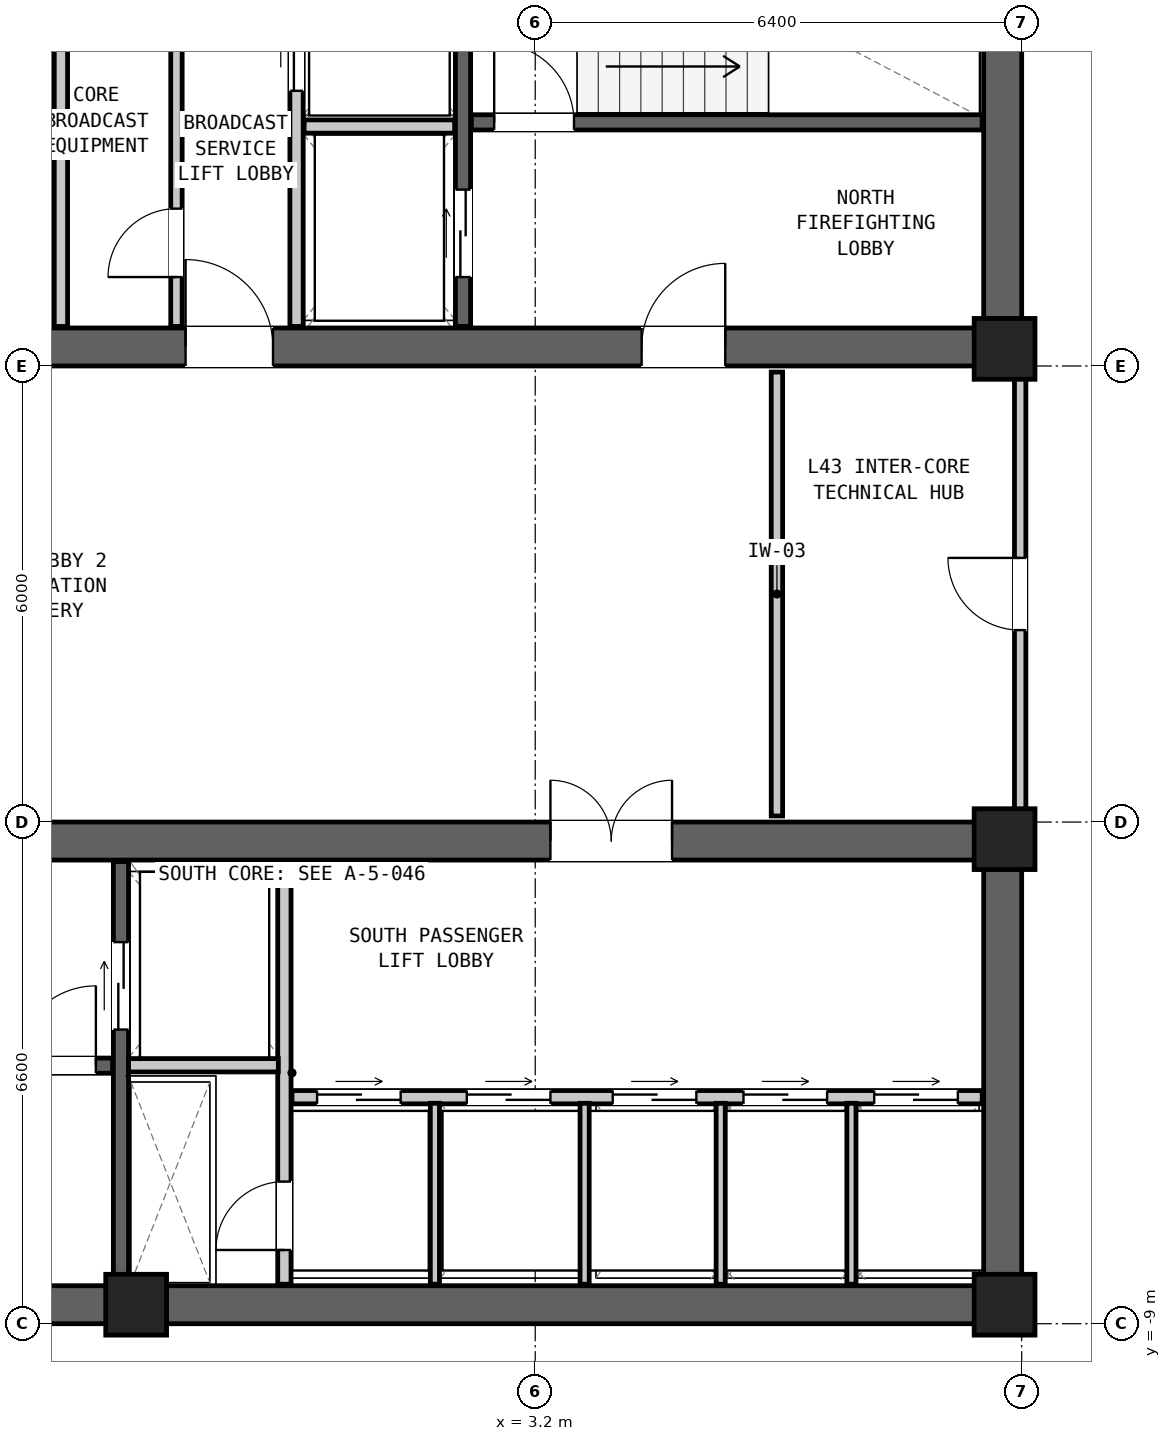
"""IFC4 building model, lengths in metres.
Left out: names, types, materials, properties, quantities, classifications, styles, units other than length and angle.
Written with IfcOpenShell. Run it as: python <this file> out.ifc"""

import sys

from ifc_helpers import new_model, si_unit, direction, frame, frame_2d, origin, origin_2d, place, context, subcontext, project, spatial, rectangle, extrude, element, fill, save


model = new_model("IFC4")
c1 = context("Model", 3, precision=1e-05, world=origin(), true_north=direction((0.0, 1.0)))
c2 = subcontext(c1, "Body", "Model", "MODEL_VIEW")
j1 = project(units=[si_unit("LENGTHUNIT", "METRE"), si_unit("PLANEANGLEUNIT", "RADIAN")], contexts=[c1])
p1 = place(None, origin())
s1 = spatial("IfcSite", under=j1, at=p1, CompositionType="ELEMENT")
p2 = place(p1, origin())
s2 = spatial("IfcBuilding", under=s1, at=p2, CompositionType="ELEMENT")
p3 = place(p2, frame((0.0, 0.0, 148.2)))
s3 = spatial("IfcBuildingStorey", under=s2, at=p3, CompositionType="ELEMENT", Elevation=148.2)
p4 = place(p3, frame((-9.6, 3.85, 0.0), z_axis=(0.0, 0.0, 1.0), x_axis=(1.0, 0.0, 0.0)))
e1 = element("IfcWall", 1, at=p4, inside=s3, PredefinedType="SHEAR", context=c2, shape_type="SweptSolid", body=[
    extrude(rectangle(XDim=19.2, YDim=0.5, at=frame_2d((9.6, 0.0))), origin(), (0.0, 0.0, 1.0), 3.6),
])
p5 = place(p4, frame((14.2, 0.0, 0.0)))
e2 = element("IfcOpeningElement", 2, at=p5, cuts=e1, PredefinedType="OPENING", context=c2, shape_type="SweptSolid", body=[
    extrude(rectangle(XDim=1.1, YDim=2.08, at=frame_2d((0.55, 1.04))), frame((0.0, 0.262, 0.0), z_axis=(0.0, -1.0, 0.0), x_axis=(1.0, 0.0, 0.0)), (0.0, 0.0, 1.0), 0.524),
])
p6 = place(p4, frame((8.2, 0.0, 0.0)))
e3 = element("IfcOpeningElement", 3, at=p6, cuts=e1, PredefinedType="OPENING", context=c2, shape_type="SweptSolid", body=[
    extrude(rectangle(XDim=1.15, YDim=2.1, at=frame_2d((0.575, 1.05))), frame((0.0, 0.262, 0.0), z_axis=(0.0, -1.0, 0.0), x_axis=(1.0, 0.0, 0.0)), (0.0, 0.0, 1.0), 0.524),
])
p7 = place(p4, frame((2.5, 0.0, 0.0)))
e4 = element("IfcOpeningElement", 4, at=p7, cuts=e1, PredefinedType="OPENING", context=c2, shape_type="SweptSolid", body=[
    extrude(rectangle(XDim=1.2, YDim=2.1, at=frame_2d((0.6, 1.05))), frame((0.0, 0.262, 0.0), z_axis=(0.0, -1.0, 0.0), x_axis=(1.0, 0.0, 0.0)), (0.0, 0.0, 1.0), 0.524),
])
p8 = place(p3, frame((9.35, 3.6, 0.0), z_axis=(0.0, 0.0, 1.0), x_axis=(0.0, 1.0, 0.0)))
e5 = element("IfcWall", 5, at=p8, inside=s3, PredefinedType="SHEAR", context=c2, shape_type="SweptSolid", body=[
    extrude(rectangle(XDim=6.6, YDim=0.5, at=frame_2d((3.3, 0.0))), origin(), (0.0, 0.0, 1.0), 3.6),
])
p9 = place(p3, frame((-9.6, -8.75, 0.0), z_axis=(0.0, 0.0, 1.0), x_axis=(1.0, 0.0, 0.0)))
e6 = element("IfcWall", 6, at=p9, inside=s3, PredefinedType="SHEAR", context=c2, shape_type="SweptSolid", body=[
    extrude(rectangle(XDim=19.2, YDim=0.5, at=frame_2d((9.6, 0.0))), origin(), (0.0, 0.0, 1.0), 3.6),
])
p10 = place(p3, frame((-9.6, -2.65, 0.0), z_axis=(0.0, 0.0, 1.0), x_axis=(1.0, 0.0, 0.0)))
e7 = element("IfcWall", 7, at=p10, inside=s3, PredefinedType="SHEAR", context=c2, shape_type="SweptSolid", body=[
    extrude(rectangle(XDim=19.2, YDim=0.5, at=frame_2d((9.6, 0.0))), origin(), (0.0, 0.0, 1.0), 3.6),
])
p11 = place(p10, frame((3.8, 0.0, 0.0)))
e8 = element("IfcOpeningElement", 8, at=p11, cuts=e7, PredefinedType="OPENING", context=c2, shape_type="SweptSolid", body=[
    extrude(rectangle(XDim=1.1, YDim=2.08, at=frame_2d((0.55, 1.04))), frame((0.0, 0.262, 0.0), z_axis=(0.0, -1.0, 0.0), x_axis=(1.0, 0.0, 0.0)), (0.0, 0.0, 1.0), 0.524),
])
p12 = place(p10, frame((13.0, 0.0, 0.0)))
e9 = element("IfcOpeningElement", 9, at=p12, cuts=e7, PredefinedType="OPENING", context=c2, shape_type="SweptSolid", body=[
    extrude(rectangle(XDim=1.6, YDim=2.12, at=frame_2d((0.8, 1.06))), frame((0.0, 0.262, 0.0), z_axis=(0.0, -1.0, 0.0), x_axis=(1.0, 0.0, 0.0)), (0.0, 0.0, 1.0), 0.524),
])
p13 = place(p3, frame((9.35, -9.0, 0.0), z_axis=(0.0, 0.0, 1.0), x_axis=(0.0, 1.0, 0.0)))
e10 = element("IfcWall", 10, at=p13, inside=s3, PredefinedType="SHEAR", context=c2, shape_type="SweptSolid", body=[
    extrude(rectangle(XDim=6.6, YDim=0.5, at=frame_2d((3.3, 0.0))), origin(), (0.0, 0.0, 1.0), 3.6),
])
for number, where, z_axis, x_axis in (
    (11, (9.375, 3.825, 0.0), (0.0, 0.0, 1.0), (1.0, 0.0, 0.0)),
    (12, (9.375, -2.625, 0.0), (0.0, 0.0, 1.0), (1.0, 0.0, 0.0)),
    (13, (-2.05, -8.75, 0.0), (0.0, 0.0, 1.0), (1.0, 0.0, 0.0)),
    (14, (9.375, -8.75, 0.0), (0.0, 0.0, 1.0), (1.0, 0.0, 0.0)),
):
    element("IfcColumn", number, at=place(p3, frame(where, z_axis=z_axis, x_axis=x_axis)), inside=s3, PredefinedType="COLUMN", context=c2, shape_type="SweptSolid", body=[
        extrude(rectangle(XDim=0.8, YDim=0.8, at=origin_2d()), origin(), (0.0, 0.0, 1.0), 3.6),
    ])
p14 = place(p3, frame((2.36, 6.805, 0.0), z_axis=(0.0, 0.0, 1.0), x_axis=(1.0, 0.0, 0.0)))
e15 = element("IfcWall", 15, at=p14, inside=s3, PredefinedType="SHEAR", context=c2, shape_type="SweptSolid", body=[
    extrude(rectangle(XDim=6.72, YDim=0.2, at=frame_2d((3.36, 0.0))), origin(), (0.0, 0.0, 1.0), 3.22),
])
p15 = place(p14, frame((0.3, 0.0, 0.0)))
e16 = element("IfcOpeningElement", 16, at=p15, cuts=e15, PredefinedType="OPENING", context=c2, shape_type="SweptSolid", body=[
    extrude(rectangle(XDim=1.05, YDim=2.08, at=frame_2d((0.525, 1.04))), frame((0.0, 0.112, 0.0), z_axis=(0.0, -1.0, 0.0), x_axis=(1.0, 0.0, 0.0)), (0.0, 0.0, 1.0), 0.224),
])
p16 = place(p3, frame((2.25, 4.12, 0.0), z_axis=(0.0, 0.0, 1.0), x_axis=(0.0, 1.0, 0.0)))
e17 = element("IfcWall", 17, at=p16, inside=s3, PredefinedType="SHEAR", context=c2, shape_type="SweptSolid", body=[
    extrude(rectangle(XDim=5.56, YDim=0.2, at=frame_2d((2.78, 0.0))), origin(), (0.0, 0.0, 1.0), 3.22),
])
p17 = place(p16, frame((0.65, 0.0, 0.0)))
e18 = element("IfcOpeningElement", 18, at=p17, cuts=e17, PredefinedType="OPENING", context=c2, shape_type="SweptSolid", body=[
    extrude(rectangle(XDim=1.15, YDim=2.08, at=frame_2d((0.575, 1.04))), frame((0.0, 0.112, 0.0), z_axis=(0.0, -1.0, 0.0), x_axis=(1.0, 0.0, 0.0)), (0.0, 0.0, 1.0), 0.224),
])
p18 = place(p3, frame((0.06, 4.12, 0.0), z_axis=(0.0, 0.0, 1.0), x_axis=(0.0, 1.0, 0.0)))
e19 = element("IfcWall", 19, at=p18, inside=s3, PredefinedType="PARTITIONING", context=c2, shape_type="SweptSolid", body=[
    extrude(rectangle(XDim=5.56, YDim=0.175, at=frame_2d((2.78, 0.0))), origin(), (0.0, 0.0, 1.0), 3.22),
])
p19 = place(p18, frame((3.1, 0.0, 0.0)))
e20 = element("IfcOpeningElement", 20, at=p19, cuts=e19, PredefinedType="OPENING", context=c2, shape_type="SweptSolid", body=[
    extrude(rectangle(XDim=1.4, YDim=2.12, at=frame_2d((0.7, 1.06))), frame((0.0, 0.1, 0.0), z_axis=(0.0, -1.0, 0.0), x_axis=(1.0, 0.0, 0.0)), (0.0, 0.0, 1.0), 0.199),
])
p20 = place(p3, frame((0.16, 6.75, 0.0), z_axis=(0.0, 0.0, 1.0), x_axis=(1.0, 0.0, 0.0)))
e21 = element("IfcWall", 21, at=p20, inside=s3, PredefinedType="PARTITIONING", context=c2, shape_type="SweptSolid", body=[
    extrude(rectangle(XDim=1.98, YDim=0.175, at=frame_2d((0.99, 0.0))), origin(), (0.0, 0.0, 1.0), 3.22),
])
p21 = place(p3, frame((-3.04, 4.12, 0.0), z_axis=(0.0, 0.0, 1.0), x_axis=(0.0, 1.0, 0.0)))
e22 = element("IfcWall", 22, at=p21, inside=s3, PredefinedType="PARTITIONING", context=c2, shape_type="SweptSolid", body=[
    extrude(rectangle(XDim=5.56, YDim=0.175, at=frame_2d((2.78, 0.0))), origin(), (0.0, 0.0, 1.0), 3.22),
])
p22 = place(p3, frame((-1.52, 4.12, 0.0), z_axis=(0.0, 0.0, 1.0), x_axis=(0.0, 1.0, 0.0)))
e23 = element("IfcWall", 23, at=p22, inside=s3, PredefinedType="PARTITIONING", context=c2, shape_type="SweptSolid", body=[
    extrude(rectangle(XDim=5.56, YDim=0.15, at=frame_2d((2.78, 0.0))), origin(), (0.0, 0.0, 1.0), 3.22),
])
p23 = place(p22, frame((4.38, 0.0, 0.0)))
e24 = element("IfcOpeningElement", 24, at=p23, cuts=e23, PredefinedType="OPENING", context=c2, shape_type="SweptSolid", body=[
    extrude(rectangle(XDim=0.9, YDim=2.05, at=frame_2d((0.45, 1.025))), frame((0.0, 0.087, 0.0), z_axis=(0.0, -1.0, 0.0), x_axis=(1.0, 0.0, 0.0)), (0.0, 0.0, 1.0), 0.174),
])
p24 = place(p22, frame((0.65, 0.0, 0.0)))
e25 = element("IfcOpeningElement", 25, at=p24, cuts=e23, PredefinedType="OPENING", context=c2, shape_type="SweptSolid", body=[
    extrude(rectangle(XDim=0.9, YDim=2.05, at=frame_2d((0.45, 1.025))), frame((0.0, 0.087, 0.0), z_axis=(0.0, -1.0, 0.0), x_axis=(1.0, 0.0, 0.0)), (0.0, 0.0, 1.0), 0.174),
])
p25 = place(p3, frame((-9.08, -5.605, 0.0), z_axis=(0.0, 0.0, 1.0), x_axis=(1.0, 0.0, 0.0)))
e26 = element("IfcWall", 26, at=p25, inside=s3, PredefinedType="SHEAR", context=c2, shape_type="SweptSolid", body=[
    extrude(rectangle(XDim=6.72, YDim=0.2, at=frame_2d((3.36, 0.0))), origin(), (0.0, 0.0, 1.0), 3.22),
])
p26 = place(p25, frame((5.45, 0.0, 0.0)))
e27 = element("IfcOpeningElement", 27, at=p26, cuts=e26, PredefinedType="OPENING", context=c2, shape_type="SweptSolid", body=[
    extrude(rectangle(XDim=1.05, YDim=2.08, at=frame_2d((0.525, 1.04))), frame((0.0, 0.112, 0.0), z_axis=(0.0, -1.0, 0.0), x_axis=(1.0, 0.0, 0.0)), (0.0, 0.0, 1.0), 0.224),
])
p27 = place(p3, frame((-2.25, -8.48, 0.0), z_axis=(0.0, 0.0, 1.0), x_axis=(0.0, 1.0, 0.0)))
e28 = element("IfcWall", 28, at=p27, inside=s3, PredefinedType="SHEAR", context=c2, shape_type="SweptSolid", body=[
    extrude(rectangle(XDim=5.56, YDim=0.2, at=frame_2d((2.78, 0.0))), origin(), (0.0, 0.0, 1.0), 3.22),
])
p28 = place(p27, frame((3.35, 0.0, 0.0)))
e29 = element("IfcOpeningElement", 29, at=p28, cuts=e28, PredefinedType="OPENING", context=c2, shape_type="SweptSolid", body=[
    extrude(rectangle(XDim=1.15, YDim=2.08, at=frame_2d((0.575, 1.04))), frame((0.0, 0.112, 0.0), z_axis=(0.0, -1.0, 0.0), x_axis=(1.0, 0.0, 0.0)), (0.0, 0.0, 1.0), 0.224),
])
p29 = place(p3, frame((-0.1, -8.48, 0.0), z_axis=(0.0, 0.0, 1.0), x_axis=(0.0, 1.0, 0.0)))
e30 = element("IfcWall", 30, at=p29, inside=s3, PredefinedType="PARTITIONING", context=c2, shape_type="SweptSolid", body=[
    extrude(rectangle(XDim=5.56, YDim=0.175, at=frame_2d((2.78, 0.0))), origin(), (0.0, 0.0, 1.0), 3.22),
])
p30 = place(p29, frame((0.45, 0.0, 0.0)))
e31 = element("IfcOpeningElement", 31, at=p30, cuts=e30, PredefinedType="OPENING", context=c2, shape_type="SweptSolid", body=[
    extrude(rectangle(XDim=0.9, YDim=2.05, at=frame_2d((0.45, 1.025))), frame((0.0, 0.1, 0.0), z_axis=(0.0, -1.0, 0.0), x_axis=(1.0, 0.0, 0.0)), (0.0, 0.0, 1.0), 0.199),
])
p31 = place(p3, frame((-2.15, -5.6, 0.0), z_axis=(0.0, 0.0, 1.0), x_axis=(1.0, 0.0, 0.0)))
e32 = element("IfcWall", 32, at=p31, inside=s3, PredefinedType="PARTITIONING", context=c2, shape_type="SweptSolid", body=[
    extrude(rectangle(XDim=1.97, YDim=0.175, at=frame_2d((0.985, 0.0))), origin(), (0.0, 0.0, 1.0), 3.22),
])
p32 = place(p3, frame((0.0, -6.02, 0.0), z_axis=(0.0, 0.0, 1.0), x_axis=(1.0, 0.0, 0.0)))
e33 = element("IfcWall", 33, at=p32, inside=s3, PredefinedType="PARTITIONING", context=c2, shape_type="SweptSolid", body=[
    extrude(rectangle(XDim=9.08, YDim=0.175, at=frame_2d((4.54, 0.0))), origin(), (0.0, 0.0, 1.0), 3.22),
])
p33 = place(p32, frame((0.33, 0.0, 0.0)))
e34 = element("IfcOpeningElement", 34, at=p33, cuts=e33, PredefinedType="OPENING", context=c2, shape_type="SweptSolid", body=[
    extrude(rectangle(XDim=1.1, YDim=2.06, at=frame_2d((0.55, 1.03))), frame((0.0, 0.1, 0.0), z_axis=(0.0, -1.0, 0.0), x_axis=(1.0, 0.0, 0.0)), (0.0, 0.0, 1.0), 0.199),
])
p34 = place(p32, frame((2.3, 0.0, 0.0)))
e35 = element("IfcOpeningElement", 35, at=p34, cuts=e33, PredefinedType="OPENING", context=c2, shape_type="SweptSolid", body=[
    extrude(rectangle(XDim=1.1, YDim=2.06, at=frame_2d((0.55, 1.03))), frame((0.0, 0.1, 0.0), z_axis=(0.0, -1.0, 0.0), x_axis=(1.0, 0.0, 0.0)), (0.0, 0.0, 1.0), 0.199),
])
p35 = place(p32, frame((4.22, 0.0, 0.0)))
e36 = element("IfcOpeningElement", 36, at=p35, cuts=e33, PredefinedType="OPENING", context=c2, shape_type="SweptSolid", body=[
    extrude(rectangle(XDim=1.1, YDim=2.06, at=frame_2d((0.55, 1.03))), frame((0.0, 0.1, 0.0), z_axis=(0.0, -1.0, 0.0), x_axis=(1.0, 0.0, 0.0)), (0.0, 0.0, 1.0), 0.199),
])
p36 = place(p32, frame((5.94, 0.0, 0.0)))
e37 = element("IfcOpeningElement", 37, at=p36, cuts=e33, PredefinedType="OPENING", context=c2, shape_type="SweptSolid", body=[
    extrude(rectangle(XDim=1.1, YDim=2.06, at=frame_2d((0.55, 1.03))), frame((0.0, 0.1, 0.0), z_axis=(0.0, -1.0, 0.0), x_axis=(1.0, 0.0, 0.0)), (0.0, 0.0, 1.0), 0.199),
])
p37 = place(p32, frame((7.66, 0.0, 0.0)))
e38 = element("IfcOpeningElement", 38, at=p37, cuts=e33, PredefinedType="OPENING", context=c2, shape_type="SweptSolid", body=[
    extrude(rectangle(XDim=1.1, YDim=2.06, at=frame_2d((0.55, 1.03))), frame((0.0, 0.1, 0.0), z_axis=(0.0, -1.0, 0.0), x_axis=(1.0, 0.0, 0.0)), (0.0, 0.0, 1.0), 0.199),
])
for number, where, z_axis, x_axis in (
    (39, (1.88, -8.48, 0.0), (0.0, 0.0, 1.0), (0.0, 1.0, 0.0)),
    (40, (3.85, -8.48, 0.0), (0.0, 0.0, 1.0), (0.0, 1.0, 0.0)),
    (41, (5.64, -8.48, 0.0), (0.0, 0.0, 1.0), (0.0, 1.0, 0.0)),
    (42, (7.36, -8.48, 0.0), (0.0, 0.0, 1.0), (0.0, 1.0, 0.0)),
):
    element("IfcWall", number, at=place(p3, frame(where, z_axis=z_axis, x_axis=x_axis)), inside=s3, PredefinedType="PARTITIONING", context=c2, shape_type="SweptSolid", body=[
        extrude(rectangle(XDim=2.38, YDim=0.12, at=frame_2d((1.19, 0.0))), origin(), (0.0, 0.0, 1.0), 3.22),
    ])
p38 = place(p3, frame((6.38, -2.32, 0.0), z_axis=(0.0, 0.0, 1.0), x_axis=(0.0, 1.0, 0.0)))
e43 = element("IfcWall", 43, at=p38, inside=s3, PredefinedType="PARTITIONING", context=c2, shape_type="SweptSolid", body=[
    extrude(rectangle(XDim=5.84, YDim=0.15, at=frame_2d((2.92, 0.0))), origin(), (0.0, 0.0, 1.0), 2.588),
])
p39 = place(p3, frame((9.58, -2.32, 0.0), z_axis=(0.0, 0.0, 1.0), x_axis=(0.0, 1.0, 0.0)))
e44 = element("IfcWall", 44, at=p39, inside=s3, PredefinedType="PARTITIONING", context=c2, shape_type="SweptSolid", body=[
    extrude(rectangle(XDim=5.84, YDim=0.15, at=frame_2d((2.92, 0.0))), origin(), (0.0, 0.0, 1.0), 2.588),
])
p40 = place(p39, frame((2.445, 0.0, 0.0)))
e45 = element("IfcOpeningElement", 45, at=p40, cuts=e44, PredefinedType="OPENING", context=c2, shape_type="SweptSolid", body=[
    extrude(rectangle(XDim=0.95, YDim=2.1, at=frame_2d((0.475, 1.05))), frame((0.0, 0.087, 0.0), z_axis=(0.0, -1.0, 0.0), x_axis=(1.0, 0.0, 0.0)), (0.0, 0.0, 1.0), 0.174),
])
p41 = place(p15, origin())
e46 = element("IfcDoor", 46, at=p41, inside=s3, OperationType="SINGLE_SWING_LEFT", PredefinedType="DOOR", context=c2, shape_type="SweptSolid", body=[
    extrude(rectangle(XDim=1.05, YDim=2.08, at=frame_2d((0.525, 1.04))), frame((0.0, 0.025, 0.0), z_axis=(0.0, -1.0, 0.0), x_axis=(1.0, 0.0, 0.0)), (0.0, 0.0, 1.0), 0.05),
])
fill(e16, e46)
p42 = place(p5, origin())
e47 = element("IfcDoor", 47, at=p42, inside=s3, OperationType="SINGLE_SWING_RIGHT", PredefinedType="DOOR", context=c2, shape_type="SweptSolid", body=[
    extrude(rectangle(XDim=1.1, YDim=2.08, at=frame_2d((0.55, 1.04))), frame((0.0, 0.025, 0.0), z_axis=(0.0, -1.0, 0.0), x_axis=(1.0, 0.0, 0.0)), (0.0, 0.0, 1.0), 0.05),
])
fill(e2, e47)
p43 = place(p17, origin())
e48 = element("IfcDoor", 48, at=p43, inside=s3, OperationType="DOUBLE_DOOR_SLIDING", PredefinedType="DOOR", context=c2, shape_type="SweptSolid", body=[
    extrude(rectangle(XDim=1.15, YDim=2.08, at=frame_2d((0.575, 1.04))), frame((0.0, 0.025, 0.0), z_axis=(0.0, -1.0, 0.0), x_axis=(1.0, 0.0, 0.0)), (0.0, 0.0, 1.0), 0.05),
])
fill(e18, e48)
p44 = place(p19, origin())
e49 = element("IfcDoor", 49, at=p44, inside=s3, OperationType="DOUBLE_DOOR_SLIDING", PredefinedType="DOOR", context=c2, shape_type="SweptSolid", body=[
    extrude(rectangle(XDim=1.4, YDim=2.12, at=frame_2d((0.7, 1.06))), frame((0.0, 0.025, 0.0), z_axis=(0.0, -1.0, 0.0), x_axis=(1.0, 0.0, 0.0)), (0.0, 0.0, 1.0), 0.05),
])
fill(e20, e49)
p45 = place(p6, origin())
e50 = element("IfcDoor", 50, at=p45, inside=s3, OperationType="SINGLE_SWING_LEFT", PredefinedType="DOOR", context=c2, shape_type="SweptSolid", body=[
    extrude(rectangle(XDim=1.15, YDim=2.1, at=frame_2d((0.575, 1.05))), frame((0.0, 0.025, 0.0), z_axis=(0.0, -1.0, 0.0), x_axis=(1.0, 0.0, 0.0)), (0.0, 0.0, 1.0), 0.05),
])
fill(e3, e50)
p46 = place(p24, origin())
e51 = element("IfcDoor", 51, at=p46, inside=s3, OperationType="SINGLE_SWING_LEFT", PredefinedType="DOOR", context=c2, shape_type="SweptSolid", body=[
    extrude(rectangle(XDim=0.9, YDim=2.05, at=frame_2d((0.45, 1.025))), frame((0.0, 0.025, 0.0), z_axis=(0.0, -1.0, 0.0), x_axis=(1.0, 0.0, 0.0)), (0.0, 0.0, 1.0), 0.05),
])
fill(e25, e51)
p47 = place(p26, origin())
e52 = element("IfcDoor", 52, at=p47, inside=s3, OperationType="SINGLE_SWING_RIGHT", PredefinedType="DOOR", context=c2, shape_type="SweptSolid", body=[
    extrude(rectangle(XDim=1.05, YDim=2.08, at=frame_2d((0.525, 1.04))), frame((0.0, 0.025, 0.0), z_axis=(0.0, -1.0, 0.0), x_axis=(1.0, 0.0, 0.0)), (0.0, 0.0, 1.0), 0.05),
])
fill(e27, e52)
p48 = place(p28, origin())
e53 = element("IfcDoor", 53, at=p48, inside=s3, OperationType="DOUBLE_DOOR_SLIDING", PredefinedType="DOOR", context=c2, shape_type="SweptSolid", body=[
    extrude(rectangle(XDim=1.15, YDim=2.08, at=frame_2d((0.575, 1.04))), frame((0.0, 0.025, 0.0), z_axis=(0.0, -1.0, 0.0), x_axis=(1.0, 0.0, 0.0)), (0.0, 0.0, 1.0), 0.05),
])
fill(e29, e53)
p49 = place(p30, origin())
e54 = element("IfcDoor", 54, at=p49, inside=s3, OperationType="SINGLE_SWING_LEFT", PredefinedType="DOOR", context=c2, shape_type="SweptSolid", body=[
    extrude(rectangle(XDim=0.9, YDim=2.05, at=frame_2d((0.45, 1.025))), frame((0.0, 0.025, 0.0), z_axis=(0.0, -1.0, 0.0), x_axis=(1.0, 0.0, 0.0)), (0.0, 0.0, 1.0), 0.05),
])
fill(e31, e54)
p50 = place(p33, origin())
e55 = element("IfcDoor", 55, at=p50, inside=s3, OperationType="DOUBLE_DOOR_SLIDING", PredefinedType="DOOR", context=c2, shape_type="SweptSolid", body=[
    extrude(rectangle(XDim=1.1, YDim=2.06, at=frame_2d((0.55, 1.03))), frame((0.0, 0.025, 0.0), z_axis=(0.0, -1.0, 0.0), x_axis=(1.0, 0.0, 0.0)), (0.0, 0.0, 1.0), 0.05),
])
fill(e34, e55)
p51 = place(p34, origin())
e56 = element("IfcDoor", 56, at=p51, inside=s3, OperationType="DOUBLE_DOOR_SLIDING", PredefinedType="DOOR", context=c2, shape_type="SweptSolid", body=[
    extrude(rectangle(XDim=1.1, YDim=2.06, at=frame_2d((0.55, 1.03))), frame((0.0, 0.025, 0.0), z_axis=(0.0, -1.0, 0.0), x_axis=(1.0, 0.0, 0.0)), (0.0, 0.0, 1.0), 0.05),
])
fill(e35, e56)
p52 = place(p35, origin())
e57 = element("IfcDoor", 57, at=p52, inside=s3, OperationType="DOUBLE_DOOR_SLIDING", PredefinedType="DOOR", context=c2, shape_type="SweptSolid", body=[
    extrude(rectangle(XDim=1.1, YDim=2.06, at=frame_2d((0.55, 1.03))), frame((0.0, 0.025, 0.0), z_axis=(0.0, -1.0, 0.0), x_axis=(1.0, 0.0, 0.0)), (0.0, 0.0, 1.0), 0.05),
])
fill(e36, e57)
p53 = place(p36, origin())
e58 = element("IfcDoor", 58, at=p53, inside=s3, OperationType="DOUBLE_DOOR_SLIDING", PredefinedType="DOOR", context=c2, shape_type="SweptSolid", body=[
    extrude(rectangle(XDim=1.1, YDim=2.06, at=frame_2d((0.55, 1.03))), frame((0.0, 0.025, 0.0), z_axis=(0.0, -1.0, 0.0), x_axis=(1.0, 0.0, 0.0)), (0.0, 0.0, 1.0), 0.05),
])
fill(e37, e58)
p54 = place(p37, origin())
e59 = element("IfcDoor", 59, at=p54, inside=s3, OperationType="DOUBLE_DOOR_SLIDING", PredefinedType="DOOR", context=c2, shape_type="SweptSolid", body=[
    extrude(rectangle(XDim=1.1, YDim=2.06, at=frame_2d((0.55, 1.03))), frame((0.0, 0.025, 0.0), z_axis=(0.0, -1.0, 0.0), x_axis=(1.0, 0.0, 0.0)), (0.0, 0.0, 1.0), 0.05),
])
fill(e38, e59)
p55 = place(p12, origin())
e60 = element("IfcDoor", 60, at=p55, inside=s3, OperationType="DOUBLE_DOOR_SINGLE_SWING", PredefinedType="DOOR", context=c2, shape_type="SweptSolid", body=[
    extrude(rectangle(XDim=1.6, YDim=2.12, at=frame_2d((0.8, 1.06))), frame((0.0, 0.025, 0.0), z_axis=(0.0, -1.0, 0.0), x_axis=(1.0, 0.0, 0.0)), (0.0, 0.0, 1.0), 0.05),
])
fill(e9, e60)
p56 = place(p40, origin())
e61 = element("IfcDoor", 61, at=p56, inside=s3, OperationType="SINGLE_SWING_RIGHT", PredefinedType="DOOR", context=c2, shape_type="SweptSolid", body=[
    extrude(rectangle(XDim=0.95, YDim=2.1, at=frame_2d((0.475, 1.05))), frame((0.0, 0.025, 0.0), z_axis=(0.0, -1.0, 0.0), x_axis=(1.0, 0.0, 0.0)), (0.0, 0.0, 1.0), 0.05),
])
fill(e45, e61)
save(model, sys.argv[1])
